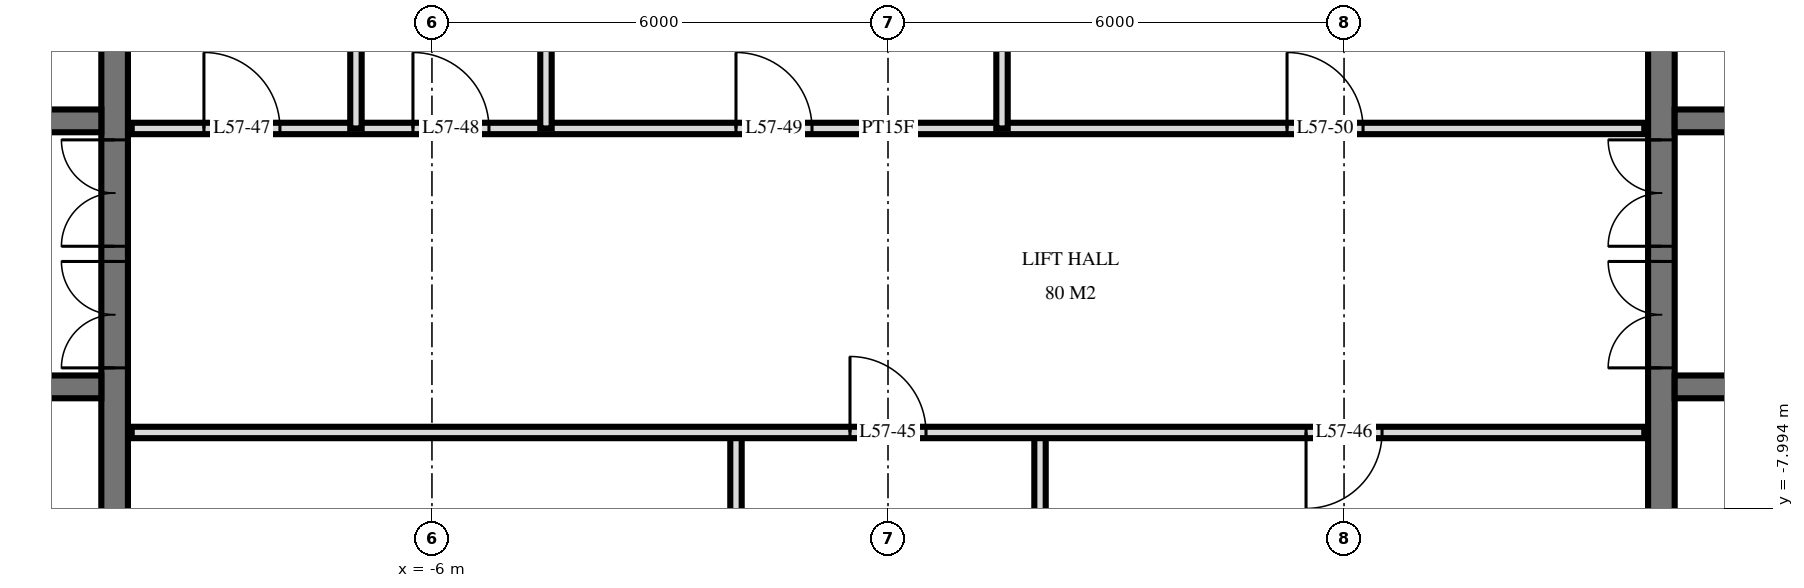
"""IFC4 building model, lengths in metres.
Left out: names, types, materials, properties, quantities, classifications, styles, units other than length and angle.
Written with IfcOpenShell. Run it as: python <this file> out.ifc"""

import sys

from ifc_helpers import new_model, si_unit, direction, frame, frame_2d, origin, place, context, subcontext, project, spatial, rectangle, extrude, element, fill, save


model = new_model("IFC4")
c1 = context("Model", 3, precision=1e-05, world=origin(), true_north=direction((0.0, 1.0)))
c2 = subcontext(c1, "Body", "Model", "MODEL_VIEW")
j1 = project(units=[si_unit("LENGTHUNIT", "METRE"), si_unit("PLANEANGLEUNIT", "RADIAN")], contexts=[c1])
p1 = place(None, origin())
s1 = spatial("IfcSite", under=j1, at=p1, CompositionType="ELEMENT")
p2 = place(p1, origin())
s2 = spatial("IfcBuilding", under=s1, at=p2, CompositionType="ELEMENT")
p3 = place(p2, frame((0.0, 0.0, 218.6)))
s3 = spatial("IfcBuildingStorey", under=s2, at=p3, CompositionType="ELEMENT", Elevation=218.6)
p4 = place(p3, frame((-10.175, -14.55, 0.0), z_axis=(0.0, 0.0, 1.0), x_axis=(0.0, 1.0, 0.0)))
e1 = element("IfcWall", 1, at=p4, inside=s3, PredefinedType="SHEAR", context=c2, shape_type="SweptSolid", body=[
    extrude(rectangle(XDim=14.1, YDim=0.35, at=frame_2d((7.05, 0.0))), origin(), (0.0, 0.0, 1.0), 3.5),
])
p5 = place(p4, frame((8.4, 0.0, 0.0)))
e2 = element("IfcOpeningElement", 2, at=p5, cuts=e1, PredefinedType="OPENING", context=c2, shape_type="SweptSolid", body=[
    extrude(rectangle(XDim=1.4, YDim=2.4, at=frame_2d((0.7, 1.2))), frame((0.0, 0.185, 0.0), z_axis=(0.0, -1.0, 0.0), x_axis=(1.0, 0.0, 0.0)), (0.0, 0.0, 1.0), 0.37),
])
p6 = place(p4, frame((10.0, 0.0, 0.0)))
e3 = element("IfcOpeningElement", 3, at=p6, cuts=e1, PredefinedType="OPENING", context=c2, shape_type="SweptSolid", body=[
    extrude(rectangle(XDim=1.4, YDim=2.4, at=frame_2d((0.7, 1.2))), frame((0.0, 0.185, 0.0), z_axis=(0.0, -1.0, 0.0), x_axis=(1.0, 0.0, 0.0)), (0.0, 0.0, 1.0), 0.37),
])
p7 = place(p4, frame((4.0, 0.0, 0.0)))
e4 = element("IfcOpeningElement", 4, at=p7, cuts=e1, PredefinedType="OPENING", context=c2, shape_type="SweptSolid", body=[
    extrude(rectangle(XDim=1.2, YDim=2.1, at=frame_2d((0.6, 1.05))), frame((0.0, 0.185, 0.0), z_axis=(0.0, -1.0, 0.0), x_axis=(1.0, 0.0, 0.0)), (0.0, 0.0, 1.0), 0.37),
])
p8 = place(p3, frame((-24.05, -2.9, 0.0), z_axis=(0.0, 0.0, 1.0), x_axis=(1.0, 0.0, 0.0)))
e5 = element("IfcWall", 5, at=p8, inside=s3, PredefinedType="SHEAR", context=c2, shape_type="SweptSolid", body=[
    extrude(rectangle(XDim=13.7, YDim=0.3, at=frame_2d((6.85, 0.0))), origin(), (0.0, 0.0, 1.0), 3.5),
])
p9 = place(p8, frame((0.55, 0.0, 0.0)))
e6 = element("IfcOpeningElement", 6, at=p9, cuts=e5, PredefinedType="OPENING", context=c2, shape_type="SweptSolid", body=[
    extrude(rectangle(XDim=1.1, YDim=2.1, at=frame_2d((0.55, 1.05))), frame((0.0, 0.16, 0.0), z_axis=(0.0, -1.0, 0.0), x_axis=(1.0, 0.0, 0.0)), (0.0, 0.0, 1.0), 0.32),
])
p10 = place(p8, frame((5.9, 0.0, 0.0)))
e7 = element("IfcOpeningElement", 7, at=p10, cuts=e5, PredefinedType="OPENING", context=c2, shape_type="SweptSolid", body=[
    extrude(rectangle(XDim=0.9, YDim=2.1, at=frame_2d((0.45, 1.05))), frame((0.0, 0.16, 0.0), z_axis=(0.0, -1.0, 0.0), x_axis=(1.0, 0.0, 0.0)), (0.0, 0.0, 1.0), 0.32),
])
p11 = place(p8, frame((11.85, 0.0, 0.0)))
e8 = element("IfcOpeningElement", 8, at=p11, cuts=e5, PredefinedType="OPENING", context=c2, shape_type="SweptSolid", body=[
    extrude(rectangle(XDim=1.0, YDim=2.1, at=frame_2d((0.5, 1.05))), frame((0.0, 0.16, 0.0), z_axis=(0.0, -1.0, 0.0), x_axis=(1.0, 0.0, 0.0)), (0.0, 0.0, 1.0), 0.32),
])
p12 = place(p8, frame((9.312, 0.0, 0.0)))
e9 = element("IfcOpeningElement", 9, at=p12, cuts=e5, PredefinedType="OPENING", context=c2, shape_type="SweptSolid", body=[
    extrude(rectangle(XDim=1.0, YDim=2.1, at=frame_2d((0.5, 1.05))), frame((0.0, 0.16, 0.0), z_axis=(0.0, -1.0, 0.0), x_axis=(1.0, 0.0, 0.0)), (0.0, 0.0, 1.0), 0.32),
])
p13 = place(p8, frame((7.887, 0.0, 0.0)))
e10 = element("IfcOpeningElement", 10, at=p13, cuts=e5, PredefinedType="OPENING", context=c2, shape_type="SweptSolid", body=[
    extrude(rectangle(XDim=1.0, YDim=2.1, at=frame_2d((0.5, 1.05))), frame((0.0, 0.16, 0.0), z_axis=(0.0, -1.0, 0.0), x_axis=(1.0, 0.0, 0.0)), (0.0, 0.0, 1.0), 0.32),
])
p14 = place(p8, frame((3.0, 0.0, 0.0)))
e11 = element("IfcOpeningElement", 11, at=p14, cuts=e5, PredefinedType="OPENING", context=c2, shape_type="SweptSolid", body=[
    extrude(rectangle(XDim=1.0, YDim=2.1, at=frame_2d((0.5, 1.05))), frame((0.0, 0.16, 0.0), z_axis=(0.0, -1.0, 0.0), x_axis=(1.0, 0.0, 0.0)), (0.0, 0.0, 1.0), 0.32),
])
p15 = place(p3, frame((-24.05, -6.4, 0.0), z_axis=(0.0, 0.0, 1.0), x_axis=(1.0, 0.0, 0.0)))
e12 = element("IfcWall", 12, at=p15, inside=s3, PredefinedType="SHEAR", context=c2, shape_type="SweptSolid", body=[
    extrude(rectangle(XDim=13.7, YDim=0.3, at=frame_2d((6.85, 0.0))), origin(), (0.0, 0.0, 1.0), 3.5),
])
p16 = place(p15, frame((0.55, 0.0, 0.0)))
e13 = element("IfcOpeningElement", 13, at=p16, cuts=e12, PredefinedType="OPENING", context=c2, shape_type="SweptSolid", body=[
    extrude(rectangle(XDim=1.1, YDim=2.1, at=frame_2d((0.55, 1.05))), frame((0.0, 0.16, 0.0), z_axis=(0.0, -1.0, 0.0), x_axis=(1.0, 0.0, 0.0)), (0.0, 0.0, 1.0), 0.32),
])
p17 = place(p15, frame((5.8, 0.0, 0.0)))
e14 = element("IfcOpeningElement", 14, at=p17, cuts=e12, PredefinedType="OPENING", context=c2, shape_type="SweptSolid", body=[
    extrude(rectangle(XDim=1.1, YDim=2.1, at=frame_2d((0.55, 1.05))), frame((0.0, 0.16, 0.0), z_axis=(0.0, -1.0, 0.0), x_axis=(1.0, 0.0, 0.0)), (0.0, 0.0, 1.0), 0.32),
])
p18 = place(p3, frame((10.175, -14.55, 0.0), z_axis=(0.0, 0.0, 1.0), x_axis=(0.0, 1.0, 0.0)))
e15 = element("IfcWall", 15, at=p18, inside=s3, PredefinedType="SHEAR", context=c2, shape_type="SweptSolid", body=[
    extrude(rectangle(XDim=14.1, YDim=0.35, at=frame_2d((7.05, 0.0))), origin(), (0.0, 0.0, 1.0), 3.5),
])
p19 = place(p18, frame((8.4, 0.0, 0.0)))
e16 = element("IfcOpeningElement", 16, at=p19, cuts=e15, PredefinedType="OPENING", context=c2, shape_type="SweptSolid", body=[
    extrude(rectangle(XDim=1.4, YDim=2.4, at=frame_2d((0.7, 1.2))), frame((0.0, 0.185, 0.0), z_axis=(0.0, -1.0, 0.0), x_axis=(1.0, 0.0, 0.0)), (0.0, 0.0, 1.0), 0.37),
])
p20 = place(p18, frame((10.0, 0.0, 0.0)))
e17 = element("IfcOpeningElement", 17, at=p20, cuts=e15, PredefinedType="OPENING", context=c2, shape_type="SweptSolid", body=[
    extrude(rectangle(XDim=1.4, YDim=2.4, at=frame_2d((0.7, 1.2))), frame((0.0, 0.185, 0.0), z_axis=(0.0, -1.0, 0.0), x_axis=(1.0, 0.0, 0.0)), (0.0, 0.0, 1.0), 0.37),
])
p21 = place(p18, frame((4.0, 0.0, 0.0)))
e18 = element("IfcOpeningElement", 18, at=p21, cuts=e15, PredefinedType="OPENING", context=c2, shape_type="SweptSolid", body=[
    extrude(rectangle(XDim=1.2, YDim=2.1, at=frame_2d((0.6, 1.05))), frame((0.0, 0.185, 0.0), z_axis=(0.0, -1.0, 0.0), x_axis=(1.0, 0.0, 0.0)), (0.0, 0.0, 1.0), 0.37),
])
p22 = place(p3, frame((10.35, -2.9, 0.0), z_axis=(0.0, 0.0, 1.0), x_axis=(1.0, 0.0, 0.0)))
e19 = element("IfcWall", 19, at=p22, inside=s3, PredefinedType="SHEAR", context=c2, shape_type="SweptSolid", body=[
    extrude(rectangle(XDim=13.7, YDim=0.3, at=frame_2d((6.85, 0.0))), origin(), (0.0, 0.0, 1.0), 3.5),
])
p23 = place(p22, frame((12.05, 0.0, 0.0)))
e20 = element("IfcOpeningElement", 20, at=p23, cuts=e19, PredefinedType="OPENING", context=c2, shape_type="SweptSolid", body=[
    extrude(rectangle(XDim=1.1, YDim=2.1, at=frame_2d((0.55, 1.05))), frame((0.0, 0.16, 0.0), z_axis=(0.0, -1.0, 0.0), x_axis=(1.0, 0.0, 0.0)), (0.0, 0.0, 1.0), 0.32),
])
p24 = place(p22, frame((6.9, 0.0, 0.0)))
e21 = element("IfcOpeningElement", 21, at=p24, cuts=e19, PredefinedType="OPENING", context=c2, shape_type="SweptSolid", body=[
    extrude(rectangle(XDim=0.9, YDim=2.1, at=frame_2d((0.45, 1.05))), frame((0.0, 0.16, 0.0), z_axis=(0.0, -1.0, 0.0), x_axis=(1.0, 0.0, 0.0)), (0.0, 0.0, 1.0), 0.32),
])
p25 = place(p22, frame((0.85, 0.0, 0.0)))
e22 = element("IfcOpeningElement", 22, at=p25, cuts=e19, PredefinedType="OPENING", context=c2, shape_type="SweptSolid", body=[
    extrude(rectangle(XDim=1.0, YDim=2.1, at=frame_2d((0.5, 1.05))), frame((0.0, 0.16, 0.0), z_axis=(0.0, -1.0, 0.0), x_axis=(1.0, 0.0, 0.0)), (0.0, 0.0, 1.0), 0.32),
])
p26 = place(p22, frame((3.387, 0.0, 0.0)))
e23 = element("IfcOpeningElement", 23, at=p26, cuts=e19, PredefinedType="OPENING", context=c2, shape_type="SweptSolid", body=[
    extrude(rectangle(XDim=1.0, YDim=2.1, at=frame_2d((0.5, 1.05))), frame((0.0, 0.16, 0.0), z_axis=(0.0, -1.0, 0.0), x_axis=(1.0, 0.0, 0.0)), (0.0, 0.0, 1.0), 0.32),
])
p27 = place(p22, frame((4.812, 0.0, 0.0)))
e24 = element("IfcOpeningElement", 24, at=p27, cuts=e19, PredefinedType="OPENING", context=c2, shape_type="SweptSolid", body=[
    extrude(rectangle(XDim=1.0, YDim=2.1, at=frame_2d((0.5, 1.05))), frame((0.0, 0.16, 0.0), z_axis=(0.0, -1.0, 0.0), x_axis=(1.0, 0.0, 0.0)), (0.0, 0.0, 1.0), 0.32),
])
p28 = place(p22, frame((9.7, 0.0, 0.0)))
e25 = element("IfcOpeningElement", 25, at=p28, cuts=e19, PredefinedType="OPENING", context=c2, shape_type="SweptSolid", body=[
    extrude(rectangle(XDim=1.0, YDim=2.1, at=frame_2d((0.5, 1.05))), frame((0.0, 0.16, 0.0), z_axis=(0.0, -1.0, 0.0), x_axis=(1.0, 0.0, 0.0)), (0.0, 0.0, 1.0), 0.32),
])
p29 = place(p3, frame((10.35, -6.4, 0.0), z_axis=(0.0, 0.0, 1.0), x_axis=(1.0, 0.0, 0.0)))
e26 = element("IfcWall", 26, at=p29, inside=s3, PredefinedType="SHEAR", context=c2, shape_type="SweptSolid", body=[
    extrude(rectangle(XDim=13.7, YDim=0.3, at=frame_2d((6.85, 0.0))), origin(), (0.0, 0.0, 1.0), 3.5),
])
p30 = place(p29, frame((12.05, 0.0, 0.0)))
e27 = element("IfcOpeningElement", 27, at=p30, cuts=e26, PredefinedType="OPENING", context=c2, shape_type="SweptSolid", body=[
    extrude(rectangle(XDim=1.1, YDim=2.1, at=frame_2d((0.55, 1.05))), frame((0.0, 0.16, 0.0), z_axis=(0.0, -1.0, 0.0), x_axis=(1.0, 0.0, 0.0)), (0.0, 0.0, 1.0), 0.32),
])
p31 = place(p29, frame((6.8, 0.0, 0.0)))
e28 = element("IfcOpeningElement", 28, at=p31, cuts=e26, PredefinedType="OPENING", context=c2, shape_type="SweptSolid", body=[
    extrude(rectangle(XDim=1.1, YDim=2.1, at=frame_2d((0.55, 1.05))), frame((0.0, 0.16, 0.0), z_axis=(0.0, -1.0, 0.0), x_axis=(1.0, 0.0, 0.0)), (0.0, 0.0, 1.0), 0.32),
])
p32 = place(p3, frame((2.0, -11.0, 0.0), z_axis=(0.0, 0.0, 1.0), x_axis=(0.0, 1.0, 0.0)))
e29 = element("IfcWall", 29, at=p32, inside=s3, PredefinedType="PARTITIONING", context=c2, shape_type="SweptSolid", body=[
    extrude(rectangle(XDim=4.0, YDim=0.15, at=frame_2d((2.0, 0.0))), origin(), (0.0, 0.0, 1.0), 3.22),
])
p33 = place(p3, frame((1.5, -3.0, 0.0), z_axis=(0.0, 0.0, 1.0), x_axis=(0.0, 1.0, 0.0)))
e30 = element("IfcWall", 30, at=p33, inside=s3, PredefinedType="PARTITIONING", context=c2, shape_type="SweptSolid", body=[
    extrude(rectangle(XDim=4.02, YDim=0.15, at=frame_2d((2.01, 0.0))), origin(), (0.0, 0.0, 1.0), 3.22),
])
p34 = place(p3, frame((-2.0, -11.0, 0.0), z_axis=(0.0, 0.0, 1.0), x_axis=(0.0, 1.0, 0.0)))
e31 = element("IfcWall", 31, at=p34, inside=s3, PredefinedType="PARTITIONING", context=c2, shape_type="SweptSolid", body=[
    extrude(rectangle(XDim=4.0, YDim=0.15, at=frame_2d((2.0, 0.0))), origin(), (0.0, 0.0, 1.0), 3.22),
])
for number, where, z_axis, x_axis in (
    (32, (-4.5, -3.0, 0.0), (0.0, 0.0, 1.0), (0.0, 1.0, 0.0)),
    (33, (-7.0, -3.0, 0.0), (0.0, 0.0, 1.0), (0.0, 1.0, 0.0)),
):
    element("IfcWall", number, at=place(p3, frame(where, z_axis=z_axis, x_axis=x_axis)), inside=s3, PredefinedType="PLUMBINGWALL", context=c2, shape_type="SweptSolid", body=[
        extrude(rectangle(XDim=4.02, YDim=0.15, at=frame_2d((2.01, 0.0))), origin(), (0.0, 0.0, 1.0), 3.22),
    ])
p35 = place(p3, frame((-9.95, -7.0, 0.0), z_axis=(0.0, 0.0, 1.0), x_axis=(1.0, 0.0, 0.0)))
e34 = element("IfcWall", 34, at=p35, inside=s3, PredefinedType="PARTITIONING", context=c2, shape_type="SweptSolid", body=[
    extrude(rectangle(XDim=19.9, YDim=0.15, at=frame_2d((9.95, 0.0))), origin(), (0.0, 0.0, 1.0), 3.22),
])
p36 = place(p35, frame((9.45, 0.0, 0.0)))
e35 = element("IfcOpeningElement", 35, at=p36, cuts=e34, PredefinedType="OPENING", context=c2, shape_type="SweptSolid", body=[
    extrude(rectangle(XDim=1.0, YDim=2.1, at=frame_2d((0.5, 1.05))), frame((0.0, 0.085, 0.0), z_axis=(0.0, -1.0, 0.0), x_axis=(1.0, 0.0, 0.0)), (0.0, 0.0, 1.0), 0.17),
])
p37 = place(p35, frame((15.45, 0.0, 0.0)))
e36 = element("IfcOpeningElement", 36, at=p37, cuts=e34, PredefinedType="OPENING", context=c2, shape_type="SweptSolid", body=[
    extrude(rectangle(XDim=1.0, YDim=2.1, at=frame_2d((0.5, 1.05))), frame((0.0, 0.085, 0.0), z_axis=(0.0, -1.0, 0.0), x_axis=(1.0, 0.0, 0.0)), (0.0, 0.0, 1.0), 0.17),
])
p38 = place(p3, frame((-9.95, -3.0, 0.0), z_axis=(0.0, 0.0, 1.0), x_axis=(1.0, 0.0, 0.0)))
e37 = element("IfcWall", 37, at=p38, inside=s3, PredefinedType="PARTITIONING", context=c2, shape_type="SweptSolid", body=[
    extrude(rectangle(XDim=19.9, YDim=0.15, at=frame_2d((9.95, 0.0))), origin(), (0.0, 0.0, 1.0), 3.22),
])
p39 = place(p38, frame((0.95, 0.0, 0.0)))
e38 = element("IfcOpeningElement", 38, at=p39, cuts=e37, PredefinedType="OPENING", context=c2, shape_type="SweptSolid", body=[
    extrude(rectangle(XDim=1.0, YDim=2.1, at=frame_2d((0.5, 1.05))), frame((0.0, 0.085, 0.0), z_axis=(0.0, -1.0, 0.0), x_axis=(1.0, 0.0, 0.0)), (0.0, 0.0, 1.0), 0.17),
])
p40 = place(p38, frame((3.7, 0.0, 0.0)))
e39 = element("IfcOpeningElement", 39, at=p40, cuts=e37, PredefinedType="OPENING", context=c2, shape_type="SweptSolid", body=[
    extrude(rectangle(XDim=1.0, YDim=2.1, at=frame_2d((0.5, 1.05))), frame((0.0, 0.085, 0.0), z_axis=(0.0, -1.0, 0.0), x_axis=(1.0, 0.0, 0.0)), (0.0, 0.0, 1.0), 0.17),
])
p41 = place(p38, frame((7.95, 0.0, 0.0)))
e40 = element("IfcOpeningElement", 40, at=p41, cuts=e37, PredefinedType="OPENING", context=c2, shape_type="SweptSolid", body=[
    extrude(rectangle(XDim=1.0, YDim=2.1, at=frame_2d((0.5, 1.05))), frame((0.0, 0.085, 0.0), z_axis=(0.0, -1.0, 0.0), x_axis=(1.0, 0.0, 0.0)), (0.0, 0.0, 1.0), 0.17),
])
p42 = place(p38, frame((15.2, 0.0, 0.0)))
e41 = element("IfcOpeningElement", 41, at=p42, cuts=e37, PredefinedType="OPENING", context=c2, shape_type="SweptSolid", body=[
    extrude(rectangle(XDim=1.0, YDim=2.1, at=frame_2d((0.5, 1.05))), frame((0.0, 0.085, 0.0), z_axis=(0.0, -1.0, 0.0), x_axis=(1.0, 0.0, 0.0)), (0.0, 0.0, 1.0), 0.17),
])
p43 = place(p5, origin())
e42 = element("IfcDoor", 42, at=p43, inside=s3, OperationType="DOUBLE_DOOR_SINGLE_SWING", PredefinedType="DOOR", context=c2, shape_type="SweptSolid", body=[
    extrude(rectangle(XDim=1.4, YDim=2.4, at=frame_2d((0.7, 1.2))), frame((0.0, 0.025, 0.0), z_axis=(0.0, -1.0, 0.0), x_axis=(1.0, 0.0, 0.0)), (0.0, 0.0, 1.0), 0.05),
])
fill(e2, e42)
p44 = place(p6, origin())
e43 = element("IfcDoor", 43, at=p44, inside=s3, OperationType="DOUBLE_DOOR_SINGLE_SWING", PredefinedType="DOOR", context=c2, shape_type="SweptSolid", body=[
    extrude(rectangle(XDim=1.4, YDim=2.4, at=frame_2d((0.7, 1.2))), frame((0.0, 0.025, 0.0), z_axis=(0.0, -1.0, 0.0), x_axis=(1.0, 0.0, 0.0)), (0.0, 0.0, 1.0), 0.05),
])
fill(e3, e43)
p45 = place(p19, origin())
e44 = element("IfcDoor", 44, at=p45, inside=s3, OperationType="DOUBLE_DOOR_SINGLE_SWING", PredefinedType="DOOR", context=c2, shape_type="SweptSolid", body=[
    extrude(rectangle(XDim=1.4, YDim=2.4, at=frame_2d((0.7, 1.2))), frame((0.0, 0.025, 0.0), z_axis=(0.0, -1.0, 0.0), x_axis=(1.0, 0.0, 0.0)), (0.0, 0.0, 1.0), 0.05),
])
fill(e16, e44)
p46 = place(p20, origin())
e45 = element("IfcDoor", 45, at=p46, inside=s3, OperationType="DOUBLE_DOOR_SINGLE_SWING", PredefinedType="DOOR", context=c2, shape_type="SweptSolid", body=[
    extrude(rectangle(XDim=1.4, YDim=2.4, at=frame_2d((0.7, 1.2))), frame((0.0, 0.025, 0.0), z_axis=(0.0, -1.0, 0.0), x_axis=(1.0, 0.0, 0.0)), (0.0, 0.0, 1.0), 0.05),
])
fill(e17, e45)
p47 = place(p36, origin())
e46 = element("IfcDoor", 46, at=p47, inside=s3, OperationType="SINGLE_SWING_RIGHT", PredefinedType="DOOR", context=c2, shape_type="SweptSolid", body=[
    extrude(rectangle(XDim=1.0, YDim=2.1, at=frame_2d((0.5, 1.05))), frame((0.0, 0.025, 0.0), z_axis=(0.0, -1.0, 0.0), x_axis=(1.0, 0.0, 0.0)), (0.0, 0.0, 1.0), 0.05),
])
fill(e35, e46)
p48 = place(p37, frame((0.5, 0.0, 0.0), z_axis=(0.0, 0.0, 1.0), x_axis=(-1.0, 0.0, 0.0)))
e47 = element("IfcDoor", 47, at=p48, inside=s3, OperationType="SINGLE_SWING_LEFT", PredefinedType="DOOR", context=c2, shape_type="SweptSolid", body=[
    extrude(rectangle(XDim=1.0, YDim=2.1, at=frame_2d((0.0, 1.05))), frame((0.0, -0.025, 0.0), z_axis=(0.0, 1.0, 0.0), x_axis=(-1.0, 0.0, 0.0)), (0.0, 0.0, 1.0), 0.05),
])
fill(e36, e47)
p49 = place(p39, origin())
e48 = element("IfcDoor", 48, at=p49, inside=s3, OperationType="SINGLE_SWING_RIGHT", PredefinedType="DOOR", context=c2, shape_type="SweptSolid", body=[
    extrude(rectangle(XDim=1.0, YDim=2.1, at=frame_2d((0.5, 1.05))), frame((0.0, 0.025, 0.0), z_axis=(0.0, -1.0, 0.0), x_axis=(1.0, 0.0, 0.0)), (0.0, 0.0, 1.0), 0.05),
])
fill(e38, e48)
p50 = place(p40, origin())
e49 = element("IfcDoor", 49, at=p50, inside=s3, OperationType="SINGLE_SWING_RIGHT", PredefinedType="DOOR", context=c2, shape_type="SweptSolid", body=[
    extrude(rectangle(XDim=1.0, YDim=2.1, at=frame_2d((0.5, 1.05))), frame((0.0, 0.025, 0.0), z_axis=(0.0, -1.0, 0.0), x_axis=(1.0, 0.0, 0.0)), (0.0, 0.0, 1.0), 0.05),
])
fill(e39, e49)
p51 = place(p41, origin())
e50 = element("IfcDoor", 50, at=p51, inside=s3, OperationType="SINGLE_SWING_RIGHT", PredefinedType="DOOR", context=c2, shape_type="SweptSolid", body=[
    extrude(rectangle(XDim=1.0, YDim=2.1, at=frame_2d((0.5, 1.05))), frame((0.0, 0.025, 0.0), z_axis=(0.0, -1.0, 0.0), x_axis=(1.0, 0.0, 0.0)), (0.0, 0.0, 1.0), 0.05),
])
fill(e40, e50)
p52 = place(p42, origin())
e51 = element("IfcDoor", 51, at=p52, inside=s3, OperationType="SINGLE_SWING_RIGHT", PredefinedType="DOOR", context=c2, shape_type="SweptSolid", body=[
    extrude(rectangle(XDim=1.0, YDim=2.1, at=frame_2d((0.5, 1.05))), frame((0.0, 0.025, 0.0), z_axis=(0.0, -1.0, 0.0), x_axis=(1.0, 0.0, 0.0)), (0.0, 0.0, 1.0), 0.05),
])
fill(e41, e51)
save(model, sys.argv[1])
